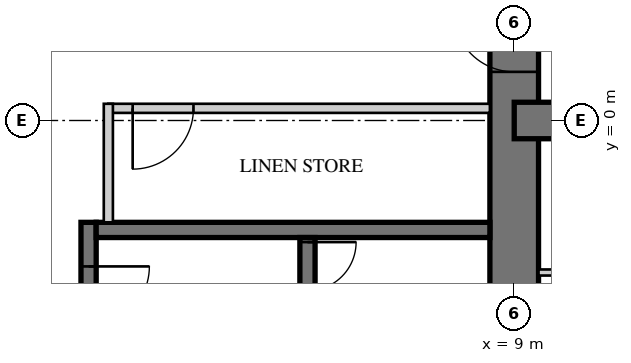
"""IFC4 building model, lengths in metres.
Left out: names, types, materials, properties, quantities, classifications, styles, units other than length and angle.
Written with IfcOpenShell. Run it as: python <this file> out.ifc"""

import sys

from ifc_helpers import new_model, si_unit, direction, frame, frame_2d, origin, place, context, subcontext, project, spatial, rectangle, extrude, element, fill, save


model = new_model("IFC4")
c1 = context("Model", 3, precision=1e-05, world=origin(), true_north=direction((0.0, 1.0)))
c2 = subcontext(c1, "Body", "Model", "MODEL_VIEW")
j1 = project(units=[si_unit("LENGTHUNIT", "METRE"), si_unit("PLANEANGLEUNIT", "RADIAN")], contexts=[c1])
p1 = place(None, origin())
s1 = spatial("IfcSite", under=j1, at=p1, CompositionType="ELEMENT")
p2 = place(p1, origin())
s2 = spatial("IfcBuilding", under=s1, at=p2, CompositionType="ELEMENT")
p3 = place(p2, frame((0.0, 0.0, 261.1)))
s3 = spatial("IfcBuildingStorey", under=s2, at=p3, CompositionType="ELEMENT", Elevation=261.1)
p4 = place(p3, frame((9.0, -9.0, 0.0), z_axis=(0.0, 0.0, 1.0), x_axis=(0.0, 1.0, 0.0)))
e1 = element("IfcWall", 1, at=p4, inside=s3, PredefinedType="SHEAR", context=c2, shape_type="SweptSolid", body=[
    extrude(rectangle(XDim=18.0, YDim=0.8, at=frame_2d((9.0, 0.0))), origin(), (0.0, 0.0, 1.0), 3.4),
])
p5 = place(p4, frame((9.8, 0.0, 0.0)))
e2 = element("IfcOpeningElement", 2, at=p5, cuts=e1, PredefinedType="OPENING", context=c2, shape_type="SweptSolid", body=[
    extrude(rectangle(XDim=1.0, YDim=2.4, at=frame_2d((0.5, 1.2))), frame((0.0, 0.41, 0.0), z_axis=(0.0, -1.0, 0.0), x_axis=(1.0, 0.0, 0.0)), (0.0, 0.0, 1.0), 0.82),
])
p6 = place(p3, frame((2.0, -1.675, 0.0), z_axis=(0.0, 0.0, 1.0), x_axis=(0.0, -1.0, 0.0)))
e3 = element("IfcWall", 3, at=p6, inside=s3, PredefinedType="SHEAR", context=c2, shape_type="SweptSolid", body=[
    extrude(rectangle(XDim=6.925, YDim=0.25, at=frame_2d((3.462, 0.0))), origin(), (0.0, 0.0, 1.0), 3.4),
])
p7 = place(p6, frame((0.725, 0.0, 0.0)))
e4 = element("IfcOpeningElement", 4, at=p7, cuts=e3, PredefinedType="OPENING", context=c2, shape_type="SweptSolid", body=[
    extrude(rectangle(XDim=1.0, YDim=2.1, at=frame_2d((0.5, 1.05))), frame((0.0, 0.135, 0.0), z_axis=(0.0, -1.0, 0.0), x_axis=(1.0, 0.0, 0.0)), (0.0, 0.0, 1.0), 0.27),
])
p8 = place(p3, frame((2.125, -1.8, 0.0), z_axis=(0.0, 0.0, 1.0), x_axis=(1.0, 0.0, 0.0)))
e5 = element("IfcWall", 5, at=p8, inside=s3, PredefinedType="SHEAR", context=c2, shape_type="SweptSolid", body=[
    extrude(rectangle(XDim=6.475, YDim=0.25, at=frame_2d((3.238, 0.0))), origin(), (0.0, 0.0, 1.0), 3.4),
])
p9 = place(p3, frame((5.6, -1.925, 0.0), z_axis=(0.0, 0.0, 1.0), x_axis=(0.0, -1.0, 0.0)))
e6 = element("IfcWall", 6, at=p9, inside=s3, PredefinedType="SHEAR", context=c2, shape_type="SweptSolid", body=[
    extrude(rectangle(XDim=3.55, YDim=0.25, at=frame_2d((1.775, 0.0))), origin(), (0.0, 0.0, 1.0), 3.4),
])
p10 = place(p9, frame((1.525, 0.0, 0.0)))
e7 = element("IfcOpeningElement", 7, at=p10, cuts=e6, PredefinedType="OPENING", context=c2, shape_type="SweptSolid", body=[
    extrude(rectangle(XDim=1.1, YDim=2.2, at=frame_2d((0.55, 1.1))), frame((0.0, 0.135, 0.0), z_axis=(0.0, -1.0, 0.0), x_axis=(1.0, 0.0, 0.0)), (0.0, 0.0, 1.0), 0.27),
])
p11 = place(p9, frame((0.075, 0.0, 0.0)))
e8 = element("IfcOpeningElement", 8, at=p11, cuts=e6, PredefinedType="OPENING", context=c2, shape_type="SweptSolid", body=[
    extrude(rectangle(XDim=0.8, YDim=2.1, at=frame_2d((0.4, 1.05))), frame((0.0, 0.135, 0.0), z_axis=(0.0, -1.0, 0.0), x_axis=(1.0, 0.0, 0.0)), (0.0, 0.0, 1.0), 0.27),
])
p12 = place(p3, frame((9.0, 0.0, 0.0), z_axis=(0.0, 0.0, 1.0), x_axis=(1.0, 0.0, 0.0)))
e9 = element("IfcWall", 9, at=p12, inside=s3, PredefinedType="SHEAR", context=c2, shape_type="SweptSolid", body=[
    extrude(rectangle(XDim=9.0, YDim=0.6, at=frame_2d((4.5, 0.0))), origin(), (0.0, 0.0, 1.0), 3.4),
])
p13 = place(p12, frame((3.8, 0.0, 0.0)))
e10 = element("IfcOpeningElement", 10, at=p13, cuts=e9, PredefinedType="OPENING", context=c2, shape_type="SweptSolid", body=[
    extrude(rectangle(XDim=1.0, YDim=2.15, at=frame_2d((0.5, 1.075))), frame((0.0, 0.31, 0.0), z_axis=(0.0, -1.0, 0.0), x_axis=(1.0, 0.0, 0.0)), (0.0, 0.0, 1.0), 0.62),
])
p14 = place(p12, frame((7.0, 0.0, 0.0)))
e11 = element("IfcOpeningElement", 11, at=p14, cuts=e9, PredefinedType="OPENING", context=c2, shape_type="SweptSolid", body=[
    extrude(rectangle(XDim=1.0, YDim=2.2, at=frame_2d((0.5, 1.1))), frame((0.0, 0.31, 0.0), z_axis=(0.0, -1.0, 0.0), x_axis=(1.0, 0.0, 0.0)), (0.0, 0.0, 1.0), 0.62),
])
p15 = place(p3, frame((2.325, 0.2, 0.0), z_axis=(0.0, 0.0, 1.0), x_axis=(1.0, 0.0, 0.0)))
e12 = element("IfcWall", 12, at=p15, inside=s3, PredefinedType="PARTITIONING", context=c2, shape_type="SweptSolid", body=[
    extrude(rectangle(XDim=6.275, YDim=0.15, at=frame_2d((3.138, 0.0))), origin(), (0.0, 0.0, 1.0), 3.22),
])
p16 = place(p15, frame((0.4, 0.0, 0.0)))
e13 = element("IfcOpeningElement", 13, at=p16, cuts=e12, PredefinedType="OPENING", context=c2, shape_type="SweptSolid", body=[
    extrude(rectangle(XDim=1.0, YDim=2.1, at=frame_2d((0.5, 1.05))), frame((0.0, 0.085, 0.0), z_axis=(0.0, -1.0, 0.0), x_axis=(1.0, 0.0, 0.0)), (0.0, 0.0, 1.0), 0.17),
])
p17 = place(p3, frame((2.325, -1.675, 0.0), z_axis=(0.0, 0.0, 1.0), x_axis=(0.0, 1.0, 0.0)))
e14 = element("IfcWall", 14, at=p17, inside=s3, PredefinedType="PARTITIONING", context=c2, shape_type="SweptSolid", body=[
    extrude(rectangle(XDim=1.95, YDim=0.15, at=frame_2d((0.975, 0.0))), origin(), (0.0, 0.0, 1.0), 3.22),
])
p18 = place(p3, frame((9.4, -2.5, 0.0), z_axis=(0.0, 0.0, 1.0), x_axis=(1.0, 0.0, 0.0)))
e15 = element("IfcWall", 15, at=p18, inside=s3, PredefinedType="PARTITIONING", context=c2, shape_type="SweptSolid", body=[
    extrude(rectangle(XDim=2.65, YDim=0.1, at=frame_2d((1.325, 0.0))), origin(), (0.0, 0.0, 1.0), 3.22),
])
p19 = place(p16, frame((1.0, 0.0, 0.0), z_axis=(0.0, 0.0, 1.0), x_axis=(-1.0, 0.0, 0.0)))
e16 = element("IfcDoor", 16, at=p19, inside=s3, OperationType="SINGLE_SWING_RIGHT", PredefinedType="DOOR", context=c2, shape_type="SweptSolid", body=[
    extrude(rectangle(XDim=1.0, YDim=2.1, at=frame_2d((0.5, 1.05))), frame((0.0, 0.025, 0.0), z_axis=(0.0, -1.0, 0.0), x_axis=(1.0, 0.0, 0.0)), (0.0, 0.0, 1.0), 0.05),
])
fill(e13, e16)
p20 = place(p5, origin())
e17 = element("IfcDoor", 17, at=p20, inside=s3, OperationType="SINGLE_SWING_RIGHT", PredefinedType="DOOR", context=c2, shape_type="SweptSolid", body=[
    extrude(rectangle(XDim=1.0, YDim=2.4, at=frame_2d((0.5, 1.2))), frame((0.0, 0.055, 0.0), z_axis=(0.0, -1.0, 0.0), x_axis=(1.0, 0.0, 0.0)), (0.0, 0.0, 1.0), 0.05),
])
fill(e2, e17)
p21 = place(p7, origin())
e18 = element("IfcDoor", 18, at=p21, inside=s3, OperationType="SINGLE_SWING_LEFT", PredefinedType="DOOR", context=c2, shape_type="SweptSolid", body=[
    extrude(rectangle(XDim=1.0, YDim=2.1, at=frame_2d((0.5, 1.05))), frame((0.0, 0.025, 0.0), z_axis=(0.0, -1.0, 0.0), x_axis=(1.0, 0.0, 0.0)), (0.0, 0.0, 1.0), 0.05),
])
fill(e4, e18)
p22 = place(p11, origin())
e19 = element("IfcDoor", 19, at=p22, inside=s3, OperationType="SINGLE_SWING_LEFT", PredefinedType="DOOR", context=c2, shape_type="SweptSolid", body=[
    extrude(rectangle(XDim=0.8, YDim=2.1, at=frame_2d((0.4, 1.05))), frame((0.0, 0.025, 0.0), z_axis=(0.0, -1.0, 0.0), x_axis=(1.0, 0.0, 0.0)), (0.0, 0.0, 1.0), 0.05),
])
fill(e8, e19)
save(model, sys.argv[1])
